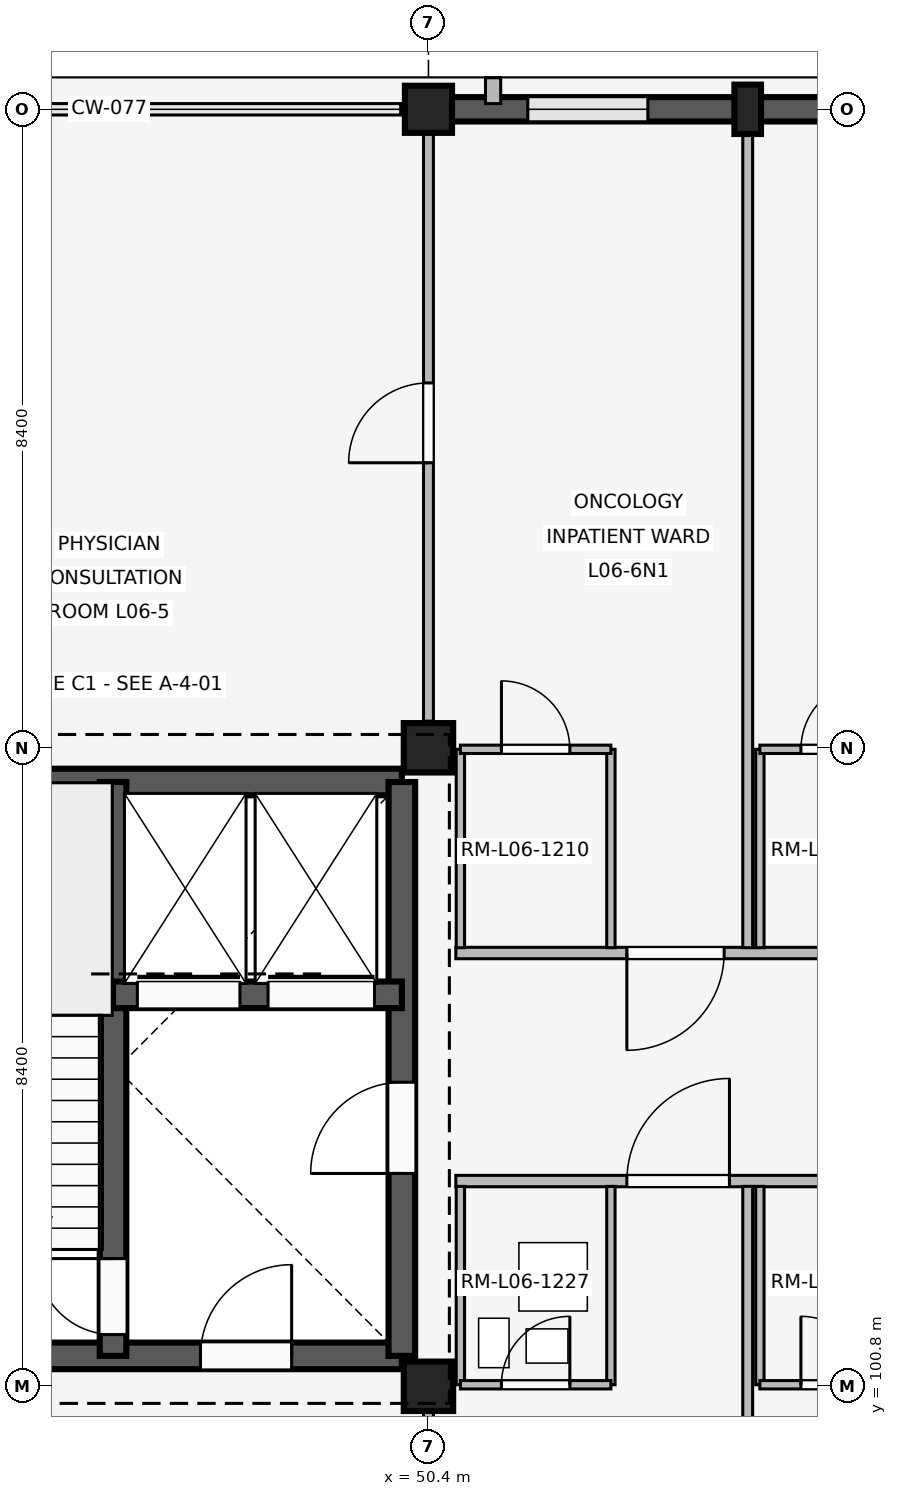
"""IFC4 building model, lengths in metres.
Left out: names, types, materials, properties, quantities, classifications, styles, units other than length and angle.
Written with IfcOpenShell. Run it as: python <this file> out.ifc"""

import sys

from ifc_helpers import new_model, si_unit, direction, frame, frame_2d, origin, origin_2d, place, context, subcontext, project, spatial, rectangle, extrude, element, fill, save


model = new_model("IFC4")
c1 = context("Model", 3, precision=1e-05, world=origin(), true_north=direction((0.0, 1.0)))
c2 = subcontext(c1, "Body", "Model", "MODEL_VIEW")
j1 = project(units=[si_unit("LENGTHUNIT", "METRE"), si_unit("PLANEANGLEUNIT", "RADIAN")], contexts=[c1])
p1 = place(None, origin())
s1 = spatial("IfcSite", under=j1, at=p1, CompositionType="ELEMENT")
p2 = place(p1, origin())
s2 = spatial("IfcBuilding", under=s1, at=p2, CompositionType="ELEMENT")
p3 = place(p2, frame((0.0, 0.0, 24.6)))
s3 = spatial("IfcBuildingStorey", under=s2, at=p3, CompositionType="ELEMENT", Elevation=24.6)
for number, where, z_axis, x_axis in (
    (1, (50.4, 100.8, 0.0), (0.0, 0.0, 1.0), (1.0, 0.0, 0.0)),
    (2, (50.4, 109.2, 0.0), (0.0, 0.0, 1.0), (1.0, 0.0, 0.0)),
):
    element("IfcColumn", number, at=place(p3, frame(where, z_axis=z_axis, x_axis=x_axis)), inside=s3, PredefinedType="COLUMN", context=c2, shape_type="SweptSolid", body=[
        extrude(rectangle(XDim=0.65, YDim=0.65, at=origin_2d()), origin(), (0.0, 0.0, 1.0), 4.2),
    ])
p4 = place(p3, frame((50.4, 117.6, 0.0), z_axis=(0.0, 0.0, 1.0), x_axis=(1.0, 0.0, 0.0)))
e3 = element("IfcColumn", 3, at=p4, inside=s3, PredefinedType="COLUMN", context=c2, shape_type="SweptSolid", body=[
    extrude(rectangle(XDim=0.62, YDim=0.62, at=origin_2d()), origin(), (0.0, 0.0, 1.0), 4.2),
])
p5 = place(p3, frame((54.6, 117.6, 0.0), z_axis=(0.0, 0.0, 1.0), x_axis=(1.0, 0.0, 0.0)))
e4 = element("IfcColumn", 4, at=p5, inside=s3, PredefinedType="PILASTER", context=c2, shape_type="SweptSolid", body=[
    extrude(rectangle(XDim=0.35, YDim=0.65, at=origin_2d()), origin(), (0.0, 0.0, 1.0), 4.2),
])
p6 = place(p3, frame((50.705, 117.6, 0.0), z_axis=(0.0, 0.0, 1.0), x_axis=(1.0, 0.0, 0.0)))
e5 = element("IfcWall", 5, at=p6, inside=s3, PredefinedType="SOLIDWALL", context=c2, shape_type="SweptSolid", body=[
    extrude(rectangle(XDim=7.79, YDim=0.32, at=frame_2d((3.895, 0.0))), origin(), (0.0, 0.0, 1.0), 3.34),
])
p7 = place(p6, frame((1.002, 0.0, 0.85)))
e6 = element("IfcOpeningElement", 6, at=p7, cuts=e5, PredefinedType="OPENING", context=c2, shape_type="SweptSolid", body=[
    extrude(rectangle(XDim=1.58, YDim=1.7, at=frame_2d((0.79, 0.85))), frame((0.0, 0.17, 0.0), z_axis=(0.0, -1.0, 0.0), x_axis=(1.0, 0.0, 0.0)), (0.0, 0.0, 1.0), 0.34),
])
p8 = place(p6, frame((5.208, 0.0, 0.85)))
e7 = element("IfcOpeningElement", 7, at=p8, cuts=e5, PredefinedType="OPENING", context=c2, shape_type="SweptSolid", body=[
    extrude(rectangle(XDim=1.58, YDim=1.7, at=frame_2d((0.79, 0.85))), frame((0.0, 0.17, 0.0), z_axis=(0.0, -1.0, 0.0), x_axis=(1.0, 0.0, 0.0)), (0.0, 0.0, 1.0), 0.34),
])
p9 = place(p3, frame((51.25, 117.675, 0.0), z_axis=(0.0, 0.0, 1.0), x_axis=(0.0, 1.0, 0.0)))
e8 = element("IfcWall", 8, at=p9, inside=s3, PredefinedType="ELEMENTEDWALL", context=c2, shape_type="SweptSolid", body=[
    extrude(rectangle(XDim=0.34, YDim=0.2, at=frame_2d((0.17, 0.0))), origin(), (0.0, 0.0, 1.0), 3.32),
])
p10 = place(p3, frame((42.55, 101.2, 0.0), z_axis=(0.0, 0.0, 1.0), x_axis=(1.0, 0.0, 0.0)))
e9 = element("IfcWall", 9, at=p10, inside=s3, PredefinedType="SHEAR", context=c2, shape_type="SweptSolid", body=[
    extrude(rectangle(XDim=7.5, YDim=0.35, at=frame_2d((3.75, 0.0))), origin(), (0.0, 0.0, 1.0), 3.92),
])
p11 = place(p10, frame((4.85, 0.0, 0.0)))
e10 = element("IfcOpeningElement", 10, at=p11, cuts=e9, PredefinedType="OPENING", context=c2, shape_type="SweptSolid", body=[
    extrude(rectangle(XDim=1.2, YDim=2.2, at=frame_2d((0.6, 1.1))), frame((0.0, 0.185, 0.0), z_axis=(0.0, -1.0, 0.0), x_axis=(1.0, 0.0, 0.0)), (0.0, 0.0, 1.0), 0.37),
])
p12 = place(p3, frame((42.55, 108.75, 0.0), z_axis=(0.0, 0.0, 1.0), x_axis=(1.0, 0.0, 0.0)))
e11 = element("IfcWall", 11, at=p12, inside=s3, PredefinedType="SHEAR", context=c2, shape_type="SweptSolid", body=[
    extrude(rectangle(XDim=7.5, YDim=0.35, at=frame_2d((3.75, 0.0))), origin(), (0.0, 0.0, 1.0), 3.92),
])
p13 = place(p3, frame((50.05, 101.2, 0.0), z_axis=(0.0, 0.0, 1.0), x_axis=(0.0, 1.0, 0.0)))
e12 = element("IfcWall", 12, at=p13, inside=s3, PredefinedType="SHEAR", context=c2, shape_type="SweptSolid", body=[
    extrude(rectangle(XDim=7.55, YDim=0.35, at=frame_2d((3.775, 0.0))), origin(), (0.0, 0.0, 1.0), 3.92),
])
p14 = place(p13, frame((2.4, 0.0, 0.0)))
e13 = element("IfcOpeningElement", 13, at=p14, cuts=e12, PredefinedType="OPENING", context=c2, shape_type="SweptSolid", body=[
    extrude(rectangle(XDim=1.2, YDim=2.2, at=frame_2d((0.6, 1.1))), frame((0.0, 0.185, 0.0), z_axis=(0.0, -1.0, 0.0), x_axis=(1.0, 0.0, 0.0)), (0.0, 0.0, 1.0), 0.37),
])
p15 = place(p3, frame((46.25, 101.2, 0.0), z_axis=(0.0, 0.0, 1.0), x_axis=(0.0, 1.0, 0.0)))
e14 = element("IfcWall", 14, at=p15, inside=s3, PredefinedType="SHEAR", context=c2, shape_type="SweptSolid", body=[
    extrude(rectangle(XDim=7.55, YDim=0.35, at=frame_2d((3.775, 0.0))), origin(), (0.0, 0.0, 1.0), 3.92),
])
p16 = place(p15, frame((0.28, 0.0, 0.0)))
e15 = element("IfcOpeningElement", 15, at=p16, cuts=e14, PredefinedType="OPENING", context=c2, shape_type="SweptSolid", body=[
    extrude(rectangle(XDim=1.0, YDim=2.15, at=frame_2d((0.5, 1.075))), frame((0.0, 0.185, 0.0), z_axis=(0.0, -1.0, 0.0), x_axis=(1.0, 0.0, 0.0)), (0.0, 0.0, 1.0), 0.37),
])
p17 = place(p3, frame((46.25, 105.95, 0.0), z_axis=(0.0, 0.0, 1.0), x_axis=(1.0, 0.0, 0.0)))
e16 = element("IfcWall", 16, at=p17, inside=s3, PredefinedType="SHEAR", context=c2, shape_type="SweptSolid", body=[
    extrude(rectangle(XDim=3.8, YDim=0.35, at=frame_2d((1.9, 0.0))), origin(), (0.0, 0.0, 1.0), 3.92),
])
p18 = place(p17, frame((0.32, 0.0, 0.0)))
e17 = element("IfcOpeningElement", 17, at=p18, cuts=e16, PredefinedType="OPENING", context=c2, shape_type="SweptSolid", body=[
    extrude(rectangle(XDim=1.35, YDim=2.25, at=frame_2d((0.675, 1.125))), frame((0.0, 0.185, 0.0), z_axis=(0.0, -1.0, 0.0), x_axis=(1.0, 0.0, 0.0)), (0.0, 0.0, 1.0), 0.37),
])
p19 = place(p17, frame((2.04, 0.0, 0.0)))
e18 = element("IfcOpeningElement", 18, at=p19, cuts=e16, PredefinedType="OPENING", context=c2, shape_type="SweptSolid", body=[
    extrude(rectangle(XDim=1.4, YDim=2.25, at=frame_2d((0.7, 1.125))), frame((0.0, 0.185, 0.0), z_axis=(0.0, -1.0, 0.0), x_axis=(1.0, 0.0, 0.0)), (0.0, 0.0, 1.0), 0.37),
])
p20 = place(p3, frame((50.4, 92.54, 0.0), z_axis=(0.0, 0.0, 1.0), x_axis=(0.0, 1.0, 0.0)))
e19 = element("IfcWall", 19, at=p20, inside=s3, PredefinedType="PARTITIONING", context=c2, shape_type="SweptSolid", body=[
    extrude(rectangle(XDim=8.21, YDim=0.13, at=frame_2d((4.105, 0.0))), origin(), (0.0, 0.0, 1.0), 3.32),
])
p21 = place(p20, frame((3.64, 0.0, 0.0)))
e20 = element("IfcOpeningElement", 20, at=p21, cuts=e19, PredefinedType="OPENING", context=c2, shape_type="SweptSolid", body=[
    extrude(rectangle(XDim=1.08, YDim=2.15, at=frame_2d((0.54, 1.075))), frame((0.0, 0.075, 0.0), z_axis=(0.0, -1.0, 0.0), x_axis=(1.0, 0.0, 0.0)), (0.0, 0.0, 1.0), 0.15),
])
p22 = place(p3, frame((50.4, 109.55, 0.0), z_axis=(0.0, 0.0, 1.0), x_axis=(0.0, 1.0, 0.0)))
e21 = element("IfcWall", 21, at=p22, inside=s3, PredefinedType="PARTITIONING", context=c2, shape_type="SweptSolid", body=[
    extrude(rectangle(XDim=7.91, YDim=0.13, at=frame_2d((3.955, 0.0))), origin(), (0.0, 0.0, 1.0), 3.32),
])
p23 = place(p22, frame((3.4, 0.0, 0.0)))
e22 = element("IfcOpeningElement", 22, at=p23, cuts=e21, PredefinedType="OPENING", context=c2, shape_type="SweptSolid", body=[
    extrude(rectangle(XDim=1.05, YDim=2.2, at=frame_2d((0.525, 1.1))), frame((0.0, 0.075, 0.0), z_axis=(0.0, -1.0, 0.0), x_axis=(1.0, 0.0, 0.0)), (0.0, 0.0, 1.0), 0.15),
])
p24 = place(p3, frame((50.76, 103.5, 0.0), z_axis=(0.0, 0.0, 1.0), x_axis=(1.0, 0.0, 0.0)))
e23 = element("IfcWall", 23, at=p24, inside=s3, PredefinedType="PARTITIONING", context=c2, shape_type="SweptSolid", body=[
    extrude(rectangle(XDim=7.96, YDim=0.15, at=frame_2d((3.98, 0.0))), origin(), (0.0, 0.0, 1.0), 3.32),
])
p25 = place(p24, frame((2.25, 0.0, 0.0)))
e24 = element("IfcOpeningElement", 24, at=p25, cuts=e23, PredefinedType="OPENING", context=c2, shape_type="SweptSolid", body=[
    extrude(rectangle(XDim=1.35, YDim=2.25, at=frame_2d((0.675, 1.125))), frame((0.0, 0.085, 0.0), z_axis=(0.0, -1.0, 0.0), x_axis=(1.0, 0.0, 0.0)), (0.0, 0.0, 1.0), 0.17),
])
p26 = place(p24, frame((5.95, 0.0, 0.0)))
e25 = element("IfcOpeningElement", 25, at=p26, cuts=e23, PredefinedType="OPENING", context=c2, shape_type="SweptSolid", body=[
    extrude(rectangle(XDim=1.35, YDim=2.25, at=frame_2d((0.675, 1.125))), frame((0.0, 0.085, 0.0), z_axis=(0.0, -1.0, 0.0), x_axis=(1.0, 0.0, 0.0)), (0.0, 0.0, 1.0), 0.17),
])
p27 = place(p3, frame((54.6, 92.5, 0.0), z_axis=(0.0, 0.0, 1.0), x_axis=(0.0, 1.0, 0.0)))
e26 = element("IfcWall", 26, at=p27, inside=s3, PredefinedType="PARTITIONING", context=c2, shape_type="SweptSolid", body=[
    extrude(rectangle(XDim=10.93, YDim=0.13, at=frame_2d((5.465, 0.0))), origin(), (0.0, 0.0, 1.0), 3.32),
])
for number, where, z_axis, x_axis in (
    (27, (50.82, 100.82, 0.0), (0.0, 0.0, 1.0), (0.0, 1.0, 0.0)),
    (28, (52.8, 100.82, 0.0), (0.0, 0.0, 1.0), (0.0, 1.0, 0.0)),
):
    element("IfcWall", number, at=place(p3, frame(where, z_axis=z_axis, x_axis=x_axis)), inside=s3, PredefinedType="PARTITIONING", context=c2, shape_type="SweptSolid", body=[
        extrude(rectangle(XDim=2.61, YDim=0.11, at=frame_2d((1.305, 0.0))), origin(), (0.0, 0.0, 1.0), 3.32),
    ])
p28 = place(p3, frame((50.82, 100.82, 0.0), z_axis=(0.0, 0.0, 1.0), x_axis=(1.0, 0.0, 0.0)))
e29 = element("IfcWall", 29, at=p28, inside=s3, PredefinedType="PARTITIONING", context=c2, shape_type="SweptSolid", body=[
    extrude(rectangle(XDim=1.98, YDim=0.11, at=frame_2d((0.99, 0.0))), origin(), (0.0, 0.0, 1.0), 3.32),
])
p29 = place(p28, frame((0.54, 0.0, 0.0)))
e30 = element("IfcOpeningElement", 30, at=p29, cuts=e29, PredefinedType="OPENING", context=c2, shape_type="SweptSolid", body=[
    extrude(rectangle(XDim=0.9, YDim=2.1, at=frame_2d((0.45, 1.05))), frame((0.0, 0.065, 0.0), z_axis=(0.0, -1.0, 0.0), x_axis=(1.0, 0.0, 0.0)), (0.0, 0.0, 1.0), 0.13),
])
p30 = place(p3, frame((54.76, 100.82, 0.0), z_axis=(0.0, 0.0, 1.0), x_axis=(0.0, 1.0, 0.0)))
e31 = element("IfcWall", 31, at=p30, inside=s3, PredefinedType="PARTITIONING", context=c2, shape_type="SweptSolid", body=[
    extrude(rectangle(XDim=2.61, YDim=0.11, at=frame_2d((1.305, 0.0))), origin(), (0.0, 0.0, 1.0), 3.32),
])
p31 = place(p3, frame((54.76, 100.82, 0.0), z_axis=(0.0, 0.0, 1.0), x_axis=(1.0, 0.0, 0.0)))
e32 = element("IfcWall", 32, at=p31, inside=s3, PredefinedType="PARTITIONING", context=c2, shape_type="SweptSolid", body=[
    extrude(rectangle(XDim=1.98, YDim=0.11, at=frame_2d((0.99, 0.0))), origin(), (0.0, 0.0, 1.0), 3.32),
])
p32 = place(p31, frame((0.54, 0.0, 0.0)))
e33 = element("IfcOpeningElement", 33, at=p32, cuts=e32, PredefinedType="OPENING", context=c2, shape_type="SweptSolid", body=[
    extrude(rectangle(XDim=0.9, YDim=2.1, at=frame_2d((0.45, 1.05))), frame((0.0, 0.065, 0.0), z_axis=(0.0, -1.0, 0.0), x_axis=(1.0, 0.0, 0.0)), (0.0, 0.0, 1.0), 0.13),
])
p33 = place(p3, frame((58.72, 106.5, 0.0), z_axis=(0.0, 0.0, 1.0), x_axis=(-1.0, 0.0, 0.0)))
e34 = element("IfcWall", 34, at=p33, inside=s3, PredefinedType="PARTITIONING", context=c2, shape_type="SweptSolid", body=[
    extrude(rectangle(XDim=7.96, YDim=0.15, at=frame_2d((3.98, 0.0))), origin(), (0.0, 0.0, 1.0), 3.32),
])
p34 = place(p33, frame((0.73, 0.0, 0.0)))
e35 = element("IfcOpeningElement", 35, at=p34, cuts=e34, PredefinedType="OPENING", context=c2, shape_type="SweptSolid", body=[
    extrude(rectangle(XDim=1.28, YDim=2.2, at=frame_2d((0.64, 1.1))), frame((0.0, 0.085, 0.0), z_axis=(0.0, -1.0, 0.0), x_axis=(1.0, 0.0, 0.0)), (0.0, 0.0, 1.0), 0.17),
])
p35 = place(p33, frame((4.43, 0.0, 0.0)))
e36 = element("IfcOpeningElement", 36, at=p35, cuts=e34, PredefinedType="OPENING", context=c2, shape_type="SweptSolid", body=[
    extrude(rectangle(XDim=1.28, YDim=2.2, at=frame_2d((0.64, 1.1))), frame((0.0, 0.085, 0.0), z_axis=(0.0, -1.0, 0.0), x_axis=(1.0, 0.0, 0.0)), (0.0, 0.0, 1.0), 0.17),
])
p36 = place(p3, frame((54.6, 106.57, 0.0), z_axis=(0.0, 0.0, 1.0), x_axis=(0.0, 1.0, 0.0)))
e37 = element("IfcWall", 37, at=p36, inside=s3, PredefinedType="PARTITIONING", context=c2, shape_type="SweptSolid", body=[
    extrude(rectangle(XDim=10.93, YDim=0.13, at=frame_2d((5.465, 0.0))), origin(), (0.0, 0.0, 1.0), 3.32),
])
for number, where, z_axis, x_axis in (
    (38, (50.82, 106.57, 0.0), (0.0, 0.0, 1.0), (0.0, 1.0, 0.0)),
    (39, (52.8, 106.57, 0.0), (0.0, 0.0, 1.0), (0.0, 1.0, 0.0)),
):
    element("IfcWall", number, at=place(p3, frame(where, z_axis=z_axis, x_axis=x_axis)), inside=s3, PredefinedType="PARTITIONING", context=c2, shape_type="SweptSolid", body=[
        extrude(rectangle(XDim=2.61, YDim=0.11, at=frame_2d((1.305, 0.0))), origin(), (0.0, 0.0, 1.0), 3.32),
    ])
p37 = place(p3, frame((50.82, 109.18, 0.0), z_axis=(0.0, 0.0, 1.0), x_axis=(1.0, 0.0, 0.0)))
e40 = element("IfcWall", 40, at=p37, inside=s3, PredefinedType="PARTITIONING", context=c2, shape_type="SweptSolid", body=[
    extrude(rectangle(XDim=1.98, YDim=0.11, at=frame_2d((0.99, 0.0))), origin(), (0.0, 0.0, 1.0), 3.32),
])
p38 = place(p37, frame((0.54, 0.0, 0.0)))
e41 = element("IfcOpeningElement", 41, at=p38, cuts=e40, PredefinedType="OPENING", context=c2, shape_type="SweptSolid", body=[
    extrude(rectangle(XDim=0.9, YDim=2.1, at=frame_2d((0.45, 1.05))), frame((0.0, 0.065, 0.0), z_axis=(0.0, -1.0, 0.0), x_axis=(1.0, 0.0, 0.0)), (0.0, 0.0, 1.0), 0.13),
])
p39 = place(p3, frame((54.76, 106.57, 0.0), z_axis=(0.0, 0.0, 1.0), x_axis=(0.0, 1.0, 0.0)))
e42 = element("IfcWall", 42, at=p39, inside=s3, PredefinedType="PARTITIONING", context=c2, shape_type="SweptSolid", body=[
    extrude(rectangle(XDim=2.61, YDim=0.11, at=frame_2d((1.305, 0.0))), origin(), (0.0, 0.0, 1.0), 3.32),
])
p40 = place(p3, frame((54.76, 109.18, 0.0), z_axis=(0.0, 0.0, 1.0), x_axis=(1.0, 0.0, 0.0)))
e43 = element("IfcWall", 43, at=p40, inside=s3, PredefinedType="PARTITIONING", context=c2, shape_type="SweptSolid", body=[
    extrude(rectangle(XDim=1.98, YDim=0.11, at=frame_2d((0.99, 0.0))), origin(), (0.0, 0.0, 1.0), 3.32),
])
p41 = place(p40, frame((0.54, 0.0, 0.0)))
e44 = element("IfcOpeningElement", 44, at=p41, cuts=e43, PredefinedType="OPENING", context=c2, shape_type="SweptSolid", body=[
    extrude(rectangle(XDim=0.9, YDim=2.1, at=frame_2d((0.45, 1.05))), frame((0.0, 0.065, 0.0), z_axis=(0.0, -1.0, 0.0), x_axis=(1.0, 0.0, 0.0)), (0.0, 0.0, 1.0), 0.13),
])
p42 = place(p7, origin())
e45 = element("IfcWindow", 45, at=p42, inside=s3, PartitioningType="SINGLE_PANEL", PredefinedType="WINDOW", context=c2, shape_type="SweptSolid", body=[
    extrude(rectangle(XDim=1.58, YDim=1.7, at=frame_2d((0.79, 0.85))), frame((0.0, 0.03, 0.0), z_axis=(0.0, -1.0, 0.0), x_axis=(1.0, 0.0, 0.0)), (0.0, 0.0, 1.0), 0.06),
])
fill(e6, e45)
p43 = place(p14, origin())
e46 = element("IfcDoor", 46, at=p43, inside=s3, OperationType="SINGLE_SWING_LEFT", PredefinedType="DOOR", context=c2, shape_type="SweptSolid", body=[
    extrude(rectangle(XDim=1.2, YDim=2.2, at=frame_2d((0.6, 1.1))), frame((0.0, 0.025, 0.0), z_axis=(0.0, -1.0, 0.0), x_axis=(1.0, 0.0, 0.0)), (0.0, 0.0, 1.0), 0.05),
])
fill(e13, e46)
p44 = place(p11, origin())
e47 = element("IfcDoor", 47, at=p44, inside=s3, OperationType="SINGLE_SWING_RIGHT", PredefinedType="DOOR", context=c2, shape_type="SweptSolid", body=[
    extrude(rectangle(XDim=1.2, YDim=2.2, at=frame_2d((0.6, 1.1))), frame((0.0, 0.025, 0.0), z_axis=(0.0, -1.0, 0.0), x_axis=(1.0, 0.0, 0.0)), (0.0, 0.0, 1.0), 0.05),
])
fill(e10, e47)
p45 = place(p16, origin())
e48 = element("IfcDoor", 48, at=p45, inside=s3, OperationType="SINGLE_SWING_RIGHT", PredefinedType="DOOR", context=c2, shape_type="SweptSolid", body=[
    extrude(rectangle(XDim=1.0, YDim=2.15, at=frame_2d((0.5, 1.075))), frame((0.0, 0.025, 0.0), z_axis=(0.0, -1.0, 0.0), x_axis=(1.0, 0.0, 0.0)), (0.0, 0.0, 1.0), 0.05),
])
fill(e15, e48)
p46 = place(p18, origin())
e49 = element("IfcDoor", 49, at=p46, inside=s3, OperationType="SLIDING_TO_LEFT", PredefinedType="DOOR", context=c2, shape_type="SweptSolid", body=[
    extrude(rectangle(XDim=1.35, YDim=2.25, at=frame_2d((0.675, 1.125))), frame((0.0, 0.025, 0.0), z_axis=(0.0, -1.0, 0.0), x_axis=(1.0, 0.0, 0.0)), (0.0, 0.0, 1.0), 0.05),
])
fill(e17, e49)
p47 = place(p19, origin())
e50 = element("IfcDoor", 50, at=p47, inside=s3, OperationType="SLIDING_TO_LEFT", PredefinedType="DOOR", context=c2, shape_type="SweptSolid", body=[
    extrude(rectangle(XDim=1.4, YDim=2.25, at=frame_2d((0.7, 1.125))), frame((0.0, 0.025, 0.0), z_axis=(0.0, -1.0, 0.0), x_axis=(1.0, 0.0, 0.0)), (0.0, 0.0, 1.0), 0.05),
])
fill(e18, e50)
p48 = place(p23, origin())
e51 = element("IfcDoor", 51, at=p48, inside=s3, OperationType="SINGLE_SWING_LEFT", PredefinedType="DOOR", context=c2, shape_type="SweptSolid", body=[
    extrude(rectangle(XDim=1.05, YDim=2.2, at=frame_2d((0.525, 1.1))), frame((0.0, 0.025, 0.0), z_axis=(0.0, -1.0, 0.0), x_axis=(1.0, 0.0, 0.0)), (0.0, 0.0, 1.0), 0.05),
])
fill(e22, e51)
p49 = place(p25, origin())
e52 = element("IfcDoor", 52, at=p49, inside=s3, OperationType="SINGLE_SWING_RIGHT", PredefinedType="DOOR", context=c2, shape_type="SweptSolid", body=[
    extrude(rectangle(XDim=1.35, YDim=2.25, at=frame_2d((0.675, 1.125))), frame((0.0, 0.025, 0.0), z_axis=(0.0, -1.0, 0.0), x_axis=(1.0, 0.0, 0.0)), (0.0, 0.0, 1.0), 0.05),
])
fill(e24, e52)
p50 = place(p29, origin())
e53 = element("IfcDoor", 53, at=p50, inside=s3, OperationType="SINGLE_SWING_RIGHT", PredefinedType="DOOR", context=c2, shape_type="SweptSolid", body=[
    extrude(rectangle(XDim=0.9, YDim=2.1, at=frame_2d((0.45, 1.05))), frame((0.0, 0.025, 0.0), z_axis=(0.0, -1.0, 0.0), x_axis=(1.0, 0.0, 0.0)), (0.0, 0.0, 1.0), 0.05),
])
fill(e30, e53)
p51 = place(p32, origin())
e54 = element("IfcDoor", 54, at=p51, inside=s3, OperationType="SINGLE_SWING_LEFT", PredefinedType="DOOR", context=c2, shape_type="SweptSolid", body=[
    extrude(rectangle(XDim=0.9, YDim=2.1, at=frame_2d((0.45, 1.05))), frame((0.0, 0.025, 0.0), z_axis=(0.0, -1.0, 0.0), x_axis=(1.0, 0.0, 0.0)), (0.0, 0.0, 1.0), 0.05),
])
fill(e33, e54)
p52 = place(p35, origin())
e55 = element("IfcDoor", 55, at=p52, inside=s3, OperationType="SINGLE_SWING_RIGHT", PredefinedType="DOOR", context=c2, shape_type="SweptSolid", body=[
    extrude(rectangle(XDim=1.28, YDim=2.2, at=frame_2d((0.64, 1.1))), frame((0.0, 0.025, 0.0), z_axis=(0.0, -1.0, 0.0), x_axis=(1.0, 0.0, 0.0)), (0.0, 0.0, 1.0), 0.05),
])
fill(e36, e55)
p53 = place(p38, origin())
e56 = element("IfcDoor", 56, at=p53, inside=s3, OperationType="SINGLE_SWING_LEFT", PredefinedType="DOOR", context=c2, shape_type="SweptSolid", body=[
    extrude(rectangle(XDim=0.9, YDim=2.1, at=frame_2d((0.45, 1.05))), frame((0.0, 0.025, 0.0), z_axis=(0.0, -1.0, 0.0), x_axis=(1.0, 0.0, 0.0)), (0.0, 0.0, 1.0), 0.05),
])
fill(e41, e56)
p54 = place(p41, origin())
e57 = element("IfcDoor", 57, at=p54, inside=s3, OperationType="SINGLE_SWING_RIGHT", PredefinedType="DOOR", context=c2, shape_type="SweptSolid", body=[
    extrude(rectangle(XDim=0.9, YDim=2.1, at=frame_2d((0.45, 1.05))), frame((0.0, 0.025, 0.0), z_axis=(0.0, -1.0, 0.0), x_axis=(1.0, 0.0, 0.0)), (0.0, 0.0, 1.0), 0.05),
])
fill(e44, e57)
save(model, sys.argv[1])
